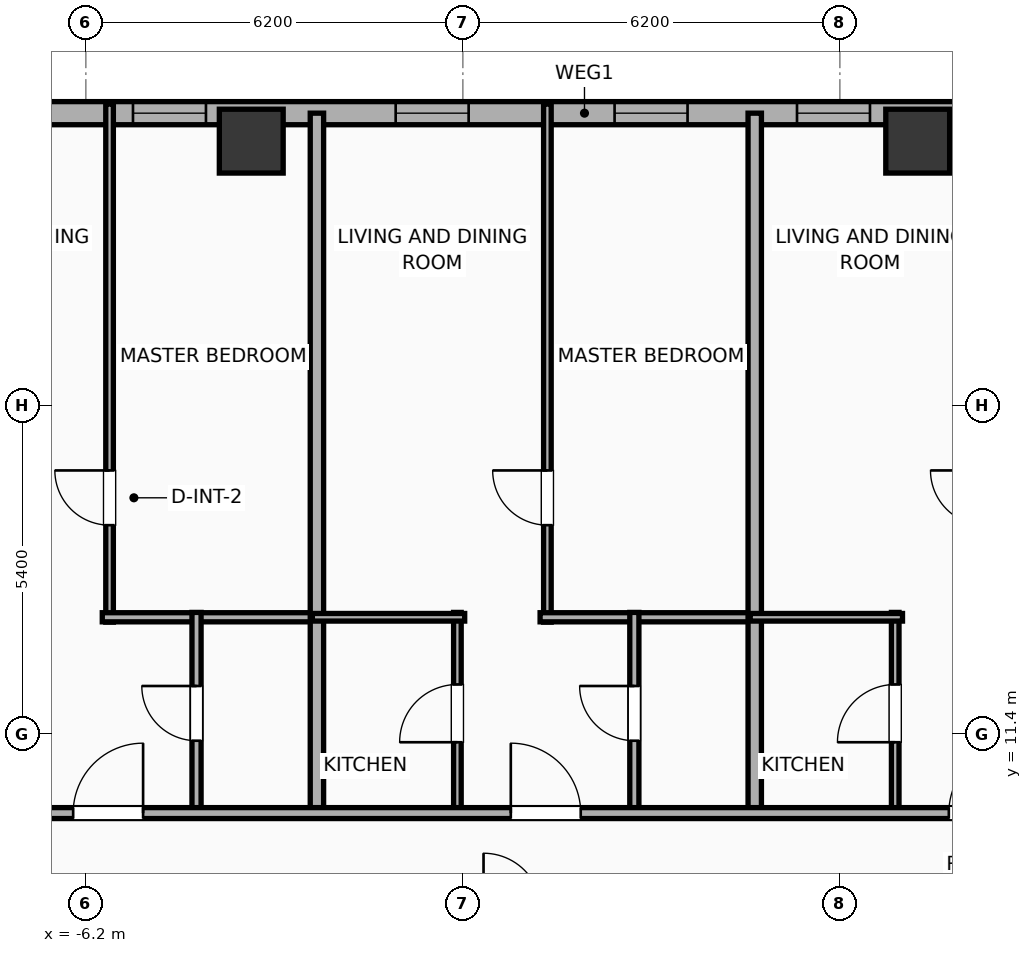
"""IFC4 building model, lengths in metres.
Left out: names, types, materials, properties, quantities, classifications, styles, units other than length and angle.
Written with IfcOpenShell. Run it as: python <this file> out.ifc"""

import sys

from ifc_helpers import new_model, si_unit, direction, frame, frame_2d, origin, origin_2d, place, context, subcontext, project, spatial, rectangle, hollow_rectangle, extrude, element, fill, save


model = new_model("IFC4")
c1 = context("Model", 3, precision=1e-05, world=origin(), true_north=direction((0.0, 1.0)))
c2 = subcontext(c1, "Body", "Model", "MODEL_VIEW")
j1 = project(units=[si_unit("LENGTHUNIT", "METRE"), si_unit("PLANEANGLEUNIT", "RADIAN")], contexts=[c1])
p1 = place(None, origin())
s1 = spatial("IfcSite", under=j1, at=p1, CompositionType="ELEMENT")
p2 = place(p1, origin())
s2 = spatial("IfcBuilding", under=s1, at=p2, CompositionType="ELEMENT")
p3 = place(p2, frame((0.0, 0.0, 136.5)))
s3 = spatial("IfcBuildingStorey", under=s2, at=p3, CompositionType="ELEMENT", Elevation=136.5)
for number, where, z_axis, x_axis in (
    (1, (7.48, 21.15, 0.0), (0.0, 0.0, 1.0), (1.0, 0.0, 0.0)),
    (2, (-3.48, 21.15, 0.0), (0.0, 0.0, 1.0), (1.0, 0.0, 0.0)),
):
    element("IfcColumn", number, at=place(p3, frame(where, z_axis=z_axis, x_axis=x_axis)), inside=s3, PredefinedType="COLUMN", context=c2, shape_type="SweptSolid", body=[
        extrude(hollow_rectangle(XDim=1.05, YDim=1.05, WallThickness=0.036, at=origin_2d()), origin(), (0.0, 0.0, 1.0), 3.865),
    ])
p4 = place(p3, frame((-25.381, 21.61, 0.0), z_axis=(0.0, 0.0, 1.0), x_axis=(1.0, 0.0, 0.0)))
e3 = element("IfcWall", 3, at=p4, inside=s3, PredefinedType="ELEMENTEDWALL", context=c2, shape_type="SweptSolid", body=[
    extrude(rectangle(XDim=54.763, YDim=0.38, at=frame_2d((27.381, 0.0))), origin(), (0.0, 0.0, 1.0), 2.39),
])
p5 = place(p4, frame((5.645, 0.0, 0.75)))
e4 = element("IfcOpeningElement", 4, at=p5, cuts=e3, PredefinedType="OPENING", context=c2, shape_type="SweptSolid", body=[
    extrude(rectangle(XDim=2.4, YDim=1.45, at=frame_2d((1.2, 0.725))), frame((0.0, 0.2, 0.0), z_axis=(0.0, -1.0, 0.0), x_axis=(1.0, 0.0, 0.0)), (0.0, 0.0, 1.0), 0.4),
])
p6 = place(p4, frame((34.677, 0.0, 0.75)))
e5 = element("IfcOpeningElement", 5, at=p6, cuts=e3, PredefinedType="OPENING", context=c2, shape_type="SweptSolid", body=[
    extrude(rectangle(XDim=2.4, YDim=1.45, at=frame_2d((1.2, 0.725))), frame((0.0, 0.2, 0.0), z_axis=(0.0, -1.0, 0.0), x_axis=(1.0, 0.0, 0.0)), (0.0, 0.0, 1.0), 0.4),
])
p7 = place(p4, frame((45.067, 0.0, 0.75)))
e6 = element("IfcOpeningElement", 6, at=p7, cuts=e3, PredefinedType="OPENING", context=c2, shape_type="SweptSolid", body=[
    extrude(rectangle(XDim=2.4, YDim=1.45, at=frame_2d((1.2, 0.725))), frame((0.0, 0.2, 0.0), z_axis=(0.0, -1.0, 0.0), x_axis=(1.0, 0.0, 0.0)), (0.0, 0.0, 1.0), 0.4),
])
p8 = place(p4, frame((2.938, 0.0, 0.55)))
e7 = element("IfcOpeningElement", 7, at=p8, cuts=e3, PredefinedType="OPENING", context=c2, shape_type="SweptSolid", body=[
    extrude(rectangle(XDim=1.2, YDim=1.15, at=frame_2d((0.6, 0.575))), frame((0.0, 0.2, 0.0), z_axis=(0.0, -1.0, 0.0), x_axis=(1.0, 0.0, 0.0)), (0.0, 0.0, 1.0), 0.4),
])
p9 = place(p4, frame((8.916, 0.0, 0.55)))
e8 = element("IfcOpeningElement", 8, at=p9, cuts=e3, PredefinedType="OPENING", context=c2, shape_type="SweptSolid", body=[
    extrude(rectangle(XDim=1.2, YDim=1.15, at=frame_2d((0.6, 0.575))), frame((0.0, 0.2, 0.0), z_axis=(0.0, -1.0, 0.0), x_axis=(1.0, 0.0, 0.0)), (0.0, 0.0, 1.0), 0.4),
])
p10 = place(p4, frame((13.476, 0.0, 0.55)))
e9 = element("IfcOpeningElement", 9, at=p10, cuts=e3, PredefinedType="OPENING", context=c2, shape_type="SweptSolid", body=[
    extrude(rectangle(XDim=1.2, YDim=1.15, at=frame_2d((0.6, 0.575))), frame((0.0, 0.2, 0.0), z_axis=(0.0, -1.0, 0.0), x_axis=(1.0, 0.0, 0.0)), (0.0, 0.0, 1.0), 0.4),
])
p11 = place(p4, frame((17.076, 0.0, 0.55)))
e10 = element("IfcOpeningElement", 10, at=p11, cuts=e3, PredefinedType="OPENING", context=c2, shape_type="SweptSolid", body=[
    extrude(rectangle(XDim=1.2, YDim=1.15, at=frame_2d((0.6, 0.575))), frame((0.0, 0.2, 0.0), z_axis=(0.0, -1.0, 0.0), x_axis=(1.0, 0.0, 0.0)), (0.0, 0.0, 1.0), 0.4),
])
p12 = place(p4, frame((19.956, 0.0, 0.55)))
e11 = element("IfcOpeningElement", 11, at=p12, cuts=e3, PredefinedType="OPENING", context=c2, shape_type="SweptSolid", body=[
    extrude(rectangle(XDim=1.2, YDim=1.15, at=frame_2d((0.6, 0.575))), frame((0.0, 0.2, 0.0), z_axis=(0.0, -1.0, 0.0), x_axis=(1.0, 0.0, 0.0)), (0.0, 0.0, 1.0), 0.4),
])
p13 = place(p4, frame((24.276, 0.0, 0.55)))
e12 = element("IfcOpeningElement", 12, at=p13, cuts=e3, PredefinedType="OPENING", context=c2, shape_type="SweptSolid", body=[
    extrude(rectangle(XDim=1.2, YDim=1.15, at=frame_2d((0.6, 0.575))), frame((0.0, 0.2, 0.0), z_axis=(0.0, -1.0, 0.0), x_axis=(1.0, 0.0, 0.0)), (0.0, 0.0, 1.0), 0.4),
])
p14 = place(p4, frame((27.876, 0.0, 0.55)))
e13 = element("IfcOpeningElement", 13, at=p14, cuts=e3, PredefinedType="OPENING", context=c2, shape_type="SweptSolid", body=[
    extrude(rectangle(XDim=1.2, YDim=1.15, at=frame_2d((0.6, 0.575))), frame((0.0, 0.2, 0.0), z_axis=(0.0, -1.0, 0.0), x_axis=(1.0, 0.0, 0.0)), (0.0, 0.0, 1.0), 0.4),
])
p15 = place(p4, frame((30.876, 0.0, 0.55)))
e14 = element("IfcOpeningElement", 14, at=p15, cuts=e3, PredefinedType="OPENING", context=c2, shape_type="SweptSolid", body=[
    extrude(rectangle(XDim=1.2, YDim=1.15, at=frame_2d((0.6, 0.575))), frame((0.0, 0.2, 0.0), z_axis=(0.0, -1.0, 0.0), x_axis=(1.0, 0.0, 0.0)), (0.0, 0.0, 1.0), 0.4),
])
p16 = place(p4, frame((38.676, 0.0, 0.55)))
e15 = element("IfcOpeningElement", 15, at=p16, cuts=e3, PredefinedType="OPENING", context=c2, shape_type="SweptSolid", body=[
    extrude(rectangle(XDim=1.2, YDim=1.15, at=frame_2d((0.6, 0.575))), frame((0.0, 0.2, 0.0), z_axis=(0.0, -1.0, 0.0), x_axis=(1.0, 0.0, 0.0)), (0.0, 0.0, 1.0), 0.4),
])
p17 = place(p4, frame((41.796, 0.0, 0.55)))
e16 = element("IfcOpeningElement", 16, at=p17, cuts=e3, PredefinedType="OPENING", context=c2, shape_type="SweptSolid", body=[
    extrude(rectangle(XDim=1.2, YDim=1.15, at=frame_2d((0.6, 0.575))), frame((0.0, 0.2, 0.0), z_axis=(0.0, -1.0, 0.0), x_axis=(1.0, 0.0, 0.0)), (0.0, 0.0, 1.0), 0.4),
])
p18 = place(p4, frame((49.476, 0.0, 0.55)))
e17 = element("IfcOpeningElement", 17, at=p18, cuts=e3, PredefinedType="OPENING", context=c2, shape_type="SweptSolid", body=[
    extrude(rectangle(XDim=1.2, YDim=1.15, at=frame_2d((0.6, 0.575))), frame((0.0, 0.2, 0.0), z_axis=(0.0, -1.0, 0.0), x_axis=(1.0, 0.0, 0.0)), (0.0, 0.0, 1.0), 0.4),
])
p19 = place(p4, frame((52.227, 0.0, 0.55)))
e18 = element("IfcOpeningElement", 18, at=p19, cuts=e3, PredefinedType="OPENING", context=c2, shape_type="SweptSolid", body=[
    extrude(rectangle(XDim=1.2, YDim=1.15, at=frame_2d((0.6, 0.575))), frame((0.0, 0.2, 0.0), z_axis=(0.0, -1.0, 0.0), x_axis=(1.0, 0.0, 0.0)), (0.0, 0.0, 1.0), 0.4),
])
p20 = place(p3, frame((-5.81, 13.24, 0.0), z_axis=(0.0, 0.0, 1.0), x_axis=(0.0, 1.0, 0.0)))
e19 = element("IfcWall", 19, at=p20, inside=s3, PredefinedType="PARTITIONING", context=c2, shape_type="SweptSolid", body=[
    extrude(rectangle(XDim=8.52, YDim=0.125, at=frame_2d((4.26, 0.0))), origin(), (0.0, 0.0, 1.0), 3.5),
])
p21 = place(p20, frame((1.595, 0.0, 0.0)))
e20 = element("IfcOpeningElement", 20, at=p21, cuts=e19, PredefinedType="OPENING", context=c2, shape_type="SweptSolid", body=[
    extrude(rectangle(XDim=0.9, YDim=2.05, at=frame_2d((0.45, 1.025))), frame((0.0, 0.073, 0.0), z_axis=(0.0, -1.0, 0.0), x_axis=(1.0, 0.0, 0.0)), (0.0, 0.0, 1.0), 0.145),
])
p22 = place(p3, frame((-5.93, 13.32, 0.0), z_axis=(0.0, 0.0, 1.0), x_axis=(1.0, 0.0, 0.0)))
e21 = element("IfcWall", 21, at=p22, inside=s3, PredefinedType="PLUMBINGWALL", context=c2, shape_type="SweptSolid", body=[
    extrude(rectangle(XDim=3.605, YDim=0.15, at=frame_2d((1.802, 0.0))), origin(), (0.0, 0.0, 1.0), 3.5),
])
p23 = place(p3, frame((-4.38, 10.08, 0.0), z_axis=(0.0, 0.0, 1.0), x_axis=(0.0, 1.0, 0.0)))
e22 = element("IfcWall", 22, at=p23, inside=s3, PredefinedType="PLUMBINGWALL", context=c2, shape_type="SweptSolid", body=[
    extrude(rectangle(XDim=3.32, YDim=0.15, at=frame_2d((1.66, 0.0))), origin(), (0.0, 0.0, 1.0), 3.5),
])
p24 = place(p23, frame((1.21, 0.0, 0.0)))
e23 = element("IfcOpeningElement", 23, at=p24, cuts=e22, PredefinedType="OPENING", context=c2, shape_type="SweptSolid", body=[
    extrude(rectangle(XDim=0.9, YDim=2.05, at=frame_2d((0.45, 1.025))), frame((0.0, 0.085, 0.0), z_axis=(0.0, -1.0, 0.0), x_axis=(1.0, 0.0, 0.0)), (0.0, 0.0, 1.0), 0.17),
])
p25 = place(p3, frame((-2.4, 10.02, 0.0), z_axis=(0.0, 0.0, 1.0), x_axis=(0.0, 1.0, 0.0)))
e24 = element("IfcWall", 24, at=p25, inside=s3, PredefinedType="PARTITIONING", context=c2, shape_type="SweptSolid", body=[
    extrude(rectangle(XDim=11.59, YDim=0.22, at=frame_2d((5.795, 0.0))), origin(), (0.0, 0.0, 1.0), 2.39),
])
p26 = place(p3, frame((1.39, 13.24, 0.0), z_axis=(0.0, 0.0, 1.0), x_axis=(0.0, 1.0, 0.0)))
e25 = element("IfcWall", 25, at=p26, inside=s3, PredefinedType="PARTITIONING", context=c2, shape_type="SweptSolid", body=[
    extrude(rectangle(XDim=8.52, YDim=0.125, at=frame_2d((4.26, 0.0))), origin(), (0.0, 0.0, 1.0), 3.5),
])
p27 = place(p26, frame((1.595, 0.0, 0.0)))
e26 = element("IfcOpeningElement", 26, at=p27, cuts=e25, PredefinedType="OPENING", context=c2, shape_type="SweptSolid", body=[
    extrude(rectangle(XDim=0.9, YDim=2.05, at=frame_2d((0.45, 1.025))), frame((0.0, 0.073, 0.0), z_axis=(0.0, -1.0, 0.0), x_axis=(1.0, 0.0, 0.0)), (0.0, 0.0, 1.0), 0.145),
])
p28 = place(p3, frame((1.27, 13.32, 0.0), z_axis=(0.0, 0.0, 1.0), x_axis=(1.0, 0.0, 0.0)))
e27 = element("IfcWall", 27, at=p28, inside=s3, PredefinedType="PLUMBINGWALL", context=c2, shape_type="SweptSolid", body=[
    extrude(rectangle(XDim=3.605, YDim=0.15, at=frame_2d((1.802, 0.0))), origin(), (0.0, 0.0, 1.0), 3.5),
])
p29 = place(p3, frame((-0.09, 10.08, 0.0), z_axis=(0.0, 0.0, 1.0), x_axis=(0.0, 1.0, 0.0)))
e28 = element("IfcWall", 28, at=p29, inside=s3, PredefinedType="PARTITIONING", context=c2, shape_type="SweptSolid", body=[
    extrude(rectangle(XDim=3.32, YDim=0.125, at=frame_2d((1.66, 0.0))), origin(), (0.0, 0.0, 1.0), 3.5),
])
p30 = place(p29, frame((1.185, 0.0, 0.0)))
e29 = element("IfcOpeningElement", 29, at=p30, cuts=e28, PredefinedType="OPENING", context=c2, shape_type="SweptSolid", body=[
    extrude(rectangle(XDim=0.95, YDim=2.05, at=frame_2d((0.475, 1.025))), frame((0.0, 0.073, 0.0), z_axis=(0.0, -1.0, 0.0), x_axis=(1.0, 0.0, 0.0)), (0.0, 0.0, 1.0), 0.145),
])
p31 = place(p3, frame((-2.475, 13.32, 0.0), z_axis=(0.0, 0.0, 1.0), x_axis=(1.0, 0.0, 0.0)))
e30 = element("IfcWall", 30, at=p31, inside=s3, PredefinedType="PARTITIONING", context=c2, shape_type="SweptSolid", body=[
    extrude(rectangle(XDim=2.505, YDim=0.125, at=frame_2d((1.252, 0.0))), origin(), (0.0, 0.0, 1.0), 3.5),
])
p32 = place(p3, frame((2.82, 10.08, 0.0), z_axis=(0.0, 0.0, 1.0), x_axis=(0.0, 1.0, 0.0)))
e31 = element("IfcWall", 31, at=p32, inside=s3, PredefinedType="PLUMBINGWALL", context=c2, shape_type="SweptSolid", body=[
    extrude(rectangle(XDim=3.32, YDim=0.15, at=frame_2d((1.66, 0.0))), origin(), (0.0, 0.0, 1.0), 3.5),
])
p33 = place(p32, frame((1.21, 0.0, 0.0)))
e32 = element("IfcOpeningElement", 32, at=p33, cuts=e31, PredefinedType="OPENING", context=c2, shape_type="SweptSolid", body=[
    extrude(rectangle(XDim=0.9, YDim=2.05, at=frame_2d((0.45, 1.025))), frame((0.0, 0.085, 0.0), z_axis=(0.0, -1.0, 0.0), x_axis=(1.0, 0.0, 0.0)), (0.0, 0.0, 1.0), 0.17),
])
p34 = place(p3, frame((4.8, 10.02, 0.0), z_axis=(0.0, 0.0, 1.0), x_axis=(0.0, 1.0, 0.0)))
e33 = element("IfcWall", 33, at=p34, inside=s3, PredefinedType="PARTITIONING", context=c2, shape_type="SweptSolid", body=[
    extrude(rectangle(XDim=11.59, YDim=0.22, at=frame_2d((5.795, 0.0))), origin(), (0.0, 0.0, 1.0), 3.5),
])
p35 = place(p3, frame((7.11, 10.08, 0.0), z_axis=(0.0, 0.0, 1.0), x_axis=(0.0, 1.0, 0.0)))
e34 = element("IfcWall", 34, at=p35, inside=s3, PredefinedType="PARTITIONING", context=c2, shape_type="SweptSolid", body=[
    extrude(rectangle(XDim=3.32, YDim=0.125, at=frame_2d((1.66, 0.0))), origin(), (0.0, 0.0, 1.0), 3.5),
])
p36 = place(p35, frame((1.185, 0.0, 0.0)))
e35 = element("IfcOpeningElement", 35, at=p36, cuts=e34, PredefinedType="OPENING", context=c2, shape_type="SweptSolid", body=[
    extrude(rectangle(XDim=0.95, YDim=2.05, at=frame_2d((0.475, 1.025))), frame((0.0, 0.073, 0.0), z_axis=(0.0, -1.0, 0.0), x_axis=(1.0, 0.0, 0.0)), (0.0, 0.0, 1.0), 0.145),
])
p37 = place(p3, frame((4.725, 13.32, 0.0), z_axis=(0.0, 0.0, 1.0), x_axis=(1.0, 0.0, 0.0)))
e36 = element("IfcWall", 36, at=p37, inside=s3, PredefinedType="PARTITIONING", context=c2, shape_type="SweptSolid", body=[
    extrude(rectangle(XDim=2.505, YDim=0.125, at=frame_2d((1.252, 0.0))), origin(), (0.0, 0.0, 1.0), 3.5),
])
p38 = place(p3, frame((-29.21, 10.1, 0.0), z_axis=(0.0, 0.0, 1.0), x_axis=(1.0, 0.0, 0.0)))
e37 = element("IfcWall", 37, at=p38, inside=s3, PredefinedType="PARTITIONING", context=c2, shape_type="SweptSolid", body=[
    extrude(rectangle(XDim=62.42, YDim=0.18, at=frame_2d((31.21, 0.0))), origin(), (0.0, 0.0, 1.0), 2.39),
])
p39 = place(p38, frame((2.74, 0.0, 0.0)))
e38 = element("IfcOpeningElement", 38, at=p39, cuts=e37, PredefinedType="OPENING", context=c2, shape_type="SweptSolid", body=[
    extrude(rectangle(XDim=0.9, YDim=2.05, at=frame_2d((0.45, 1.025))), frame((0.0, 0.1, 0.0), z_axis=(0.0, -1.0, 0.0), x_axis=(1.0, 0.0, 0.0)), (0.0, 0.0, 1.0), 0.2),
])
p40 = place(p38, frame((9.868, 0.0, 0.0)))
e39 = element("IfcOpeningElement", 39, at=p40, cuts=e37, PredefinedType="OPENING", context=c2, shape_type="SweptSolid", body=[
    extrude(rectangle(XDim=1.15, YDim=2.05, at=frame_2d((0.575, 1.025))), frame((0.0, 0.1, 0.0), z_axis=(0.0, -1.0, 0.0), x_axis=(1.0, 0.0, 0.0)), (0.0, 0.0, 1.0), 0.2),
])
p41 = place(p38, frame((15.598, 0.0, 0.0)))
e40 = element("IfcOpeningElement", 40, at=p41, cuts=e37, PredefinedType="OPENING", context=c2, shape_type="SweptSolid", body=[
    extrude(rectangle(XDim=1.15, YDim=2.05, at=frame_2d((0.575, 1.025))), frame((0.0, 0.1, 0.0), z_axis=(0.0, -1.0, 0.0), x_axis=(1.0, 0.0, 0.0)), (0.0, 0.0, 1.0), 0.2),
])
p42 = place(p38, frame((22.801, 0.0, 0.0)))
e41 = element("IfcOpeningElement", 41, at=p42, cuts=e37, PredefinedType="OPENING", context=c2, shape_type="SweptSolid", body=[
    extrude(rectangle(XDim=1.15, YDim=2.05, at=frame_2d((0.575, 1.025))), frame((0.0, 0.1, 0.0), z_axis=(0.0, -1.0, 0.0), x_axis=(1.0, 0.0, 0.0)), (0.0, 0.0, 1.0), 0.2),
])
p43 = place(p38, frame((29.998, 0.0, 0.0)))
e42 = element("IfcOpeningElement", 42, at=p43, cuts=e37, PredefinedType="OPENING", context=c2, shape_type="SweptSolid", body=[
    extrude(rectangle(XDim=1.15, YDim=2.05, at=frame_2d((0.575, 1.025))), frame((0.0, 0.1, 0.0), z_axis=(0.0, -1.0, 0.0), x_axis=(1.0, 0.0, 0.0)), (0.0, 0.0, 1.0), 0.2),
])
p44 = place(p38, frame((37.202, 0.0, 0.0)))
e43 = element("IfcOpeningElement", 43, at=p44, cuts=e37, PredefinedType="OPENING", context=c2, shape_type="SweptSolid", body=[
    extrude(rectangle(XDim=1.15, YDim=2.05, at=frame_2d((0.575, 1.025))), frame((0.0, 0.1, 0.0), z_axis=(0.0, -1.0, 0.0), x_axis=(1.0, 0.0, 0.0)), (0.0, 0.0, 1.0), 0.2),
])
p45 = place(p38, frame((44.399, 0.0, 0.0)))
e44 = element("IfcOpeningElement", 44, at=p45, cuts=e37, PredefinedType="OPENING", context=c2, shape_type="SweptSolid", body=[
    extrude(rectangle(XDim=1.15, YDim=2.05, at=frame_2d((0.575, 1.025))), frame((0.0, 0.1, 0.0), z_axis=(0.0, -1.0, 0.0), x_axis=(1.0, 0.0, 0.0)), (0.0, 0.0, 1.0), 0.2),
])
p46 = place(p38, frame((51.602, 0.0, 0.0)))
e45 = element("IfcOpeningElement", 45, at=p46, cuts=e37, PredefinedType="OPENING", context=c2, shape_type="SweptSolid", body=[
    extrude(rectangle(XDim=1.15, YDim=2.05, at=frame_2d((0.575, 1.025))), frame((0.0, 0.1, 0.0), z_axis=(0.0, -1.0, 0.0), x_axis=(1.0, 0.0, 0.0)), (0.0, 0.0, 1.0), 0.2),
])
p47 = place(p38, frame((58.762, 0.0, 0.0)))
e46 = element("IfcOpeningElement", 46, at=p47, cuts=e37, PredefinedType="OPENING", context=c2, shape_type="SweptSolid", body=[
    extrude(rectangle(XDim=0.9, YDim=2.05, at=frame_2d((0.45, 1.025))), frame((0.0, 0.1, 0.0), z_axis=(0.0, -1.0, 0.0), x_axis=(1.0, 0.0, 0.0)), (0.0, 0.0, 1.0), 0.2),
])
p48 = place(p12, origin())
e47 = element("IfcWindow", 47, at=p48, inside=s3, PartitioningType="SINGLE_PANEL", PredefinedType="WINDOW", context=c2, shape_type="SweptSolid", body=[
    extrude(rectangle(XDim=1.2, YDim=1.15, at=frame_2d((0.6, 0.575))), frame((0.0, 0.03, 0.0), z_axis=(0.0, -1.0, 0.0), x_axis=(1.0, 0.0, 0.0)), (0.0, 0.0, 1.0), 0.06),
])
fill(e11, e47)
p49 = place(p13, origin())
e48 = element("IfcWindow", 48, at=p49, inside=s3, PartitioningType="SINGLE_PANEL", PredefinedType="WINDOW", context=c2, shape_type="SweptSolid", body=[
    extrude(rectangle(XDim=1.2, YDim=1.15, at=frame_2d((0.6, 0.575))), frame((0.0, 0.03, 0.0), z_axis=(0.0, -1.0, 0.0), x_axis=(1.0, 0.0, 0.0)), (0.0, 0.0, 1.0), 0.06),
])
fill(e12, e48)
p50 = place(p14, origin())
e49 = element("IfcWindow", 49, at=p50, inside=s3, PartitioningType="SINGLE_PANEL", PredefinedType="WINDOW", context=c2, shape_type="SweptSolid", body=[
    extrude(rectangle(XDim=1.2, YDim=1.15, at=frame_2d((0.6, 0.575))), frame((0.0, 0.03, 0.0), z_axis=(0.0, -1.0, 0.0), x_axis=(1.0, 0.0, 0.0)), (0.0, 0.0, 1.0), 0.06),
])
fill(e13, e49)
p51 = place(p15, origin())
e50 = element("IfcWindow", 50, at=p51, inside=s3, PartitioningType="SINGLE_PANEL", PredefinedType="WINDOW", context=c2, shape_type="SweptSolid", body=[
    extrude(rectangle(XDim=1.2, YDim=1.15, at=frame_2d((0.6, 0.575))), frame((0.0, 0.03, 0.0), z_axis=(0.0, -1.0, 0.0), x_axis=(1.0, 0.0, 0.0)), (0.0, 0.0, 1.0), 0.06),
])
fill(e14, e50)
p52 = place(p21, origin())
e51 = element("IfcDoor", 51, at=p52, inside=s3, OperationType="SINGLE_SWING_RIGHT", PredefinedType="DOOR", context=c2, shape_type="SweptSolid", body=[
    extrude(rectangle(XDim=0.9, YDim=2.05, at=frame_2d((0.45, 1.025))), frame((0.0, 0.025, 0.0), z_axis=(0.0, -1.0, 0.0), x_axis=(1.0, 0.0, 0.0)), (0.0, 0.0, 1.0), 0.05),
])
fill(e20, e51)
p53 = place(p24, origin())
e52 = element("IfcDoor", 52, at=p53, inside=s3, OperationType="SINGLE_SWING_RIGHT", PredefinedType="DOOR", context=c2, shape_type="SweptSolid", body=[
    extrude(rectangle(XDim=0.9, YDim=2.05, at=frame_2d((0.45, 1.025))), frame((0.0, 0.025, 0.0), z_axis=(0.0, -1.0, 0.0), x_axis=(1.0, 0.0, 0.0)), (0.0, 0.0, 1.0), 0.05),
])
fill(e23, e52)
p54 = place(p27, origin())
e53 = element("IfcDoor", 53, at=p54, inside=s3, OperationType="SINGLE_SWING_RIGHT", PredefinedType="DOOR", context=c2, shape_type="SweptSolid", body=[
    extrude(rectangle(XDim=0.9, YDim=2.05, at=frame_2d((0.45, 1.025))), frame((0.0, 0.025, 0.0), z_axis=(0.0, -1.0, 0.0), x_axis=(1.0, 0.0, 0.0)), (0.0, 0.0, 1.0), 0.05),
])
fill(e26, e53)
p55 = place(p30, origin())
e54 = element("IfcDoor", 54, at=p55, inside=s3, OperationType="SINGLE_SWING_LEFT", PredefinedType="DOOR", context=c2, shape_type="SweptSolid", body=[
    extrude(rectangle(XDim=0.95, YDim=2.05, at=frame_2d((0.475, 1.025))), frame((0.0, 0.025, 0.0), z_axis=(0.0, -1.0, 0.0), x_axis=(1.0, 0.0, 0.0)), (0.0, 0.0, 1.0), 0.05),
])
fill(e29, e54)
p56 = place(p33, origin())
e55 = element("IfcDoor", 55, at=p56, inside=s3, OperationType="SINGLE_SWING_RIGHT", PredefinedType="DOOR", context=c2, shape_type="SweptSolid", body=[
    extrude(rectangle(XDim=0.9, YDim=2.05, at=frame_2d((0.45, 1.025))), frame((0.0, 0.025, 0.0), z_axis=(0.0, -1.0, 0.0), x_axis=(1.0, 0.0, 0.0)), (0.0, 0.0, 1.0), 0.05),
])
fill(e32, e55)
p57 = place(p36, origin())
e56 = element("IfcDoor", 56, at=p57, inside=s3, OperationType="SINGLE_SWING_LEFT", PredefinedType="DOOR", context=c2, shape_type="SweptSolid", body=[
    extrude(rectangle(XDim=0.95, YDim=2.05, at=frame_2d((0.475, 1.025))), frame((0.0, 0.025, 0.0), z_axis=(0.0, -1.0, 0.0), x_axis=(1.0, 0.0, 0.0)), (0.0, 0.0, 1.0), 0.05),
])
fill(e35, e56)
p58 = place(p42, origin())
e57 = element("IfcDoor", 57, at=p58, inside=s3, OperationType="SINGLE_SWING_RIGHT", PredefinedType="DOOR", context=c2, shape_type="SweptSolid", body=[
    extrude(rectangle(XDim=1.15, YDim=2.05, at=frame_2d((0.575, 1.025))), frame((0.0, 0.025, 0.0), z_axis=(0.0, -1.0, 0.0), x_axis=(1.0, 0.0, 0.0)), (0.0, 0.0, 1.0), 0.05),
])
fill(e41, e57)
p59 = place(p43, origin())
e58 = element("IfcDoor", 58, at=p59, inside=s3, OperationType="SINGLE_SWING_LEFT", PredefinedType="DOOR", context=c2, shape_type="SweptSolid", body=[
    extrude(rectangle(XDim=1.15, YDim=2.05, at=frame_2d((0.575, 1.025))), frame((0.0, 0.025, 0.0), z_axis=(0.0, -1.0, 0.0), x_axis=(1.0, 0.0, 0.0)), (0.0, 0.0, 1.0), 0.05),
])
fill(e42, e58)
p60 = place(p44, origin())
e59 = element("IfcDoor", 59, at=p60, inside=s3, OperationType="SINGLE_SWING_RIGHT", PredefinedType="DOOR", context=c2, shape_type="SweptSolid", body=[
    extrude(rectangle(XDim=1.15, YDim=2.05, at=frame_2d((0.575, 1.025))), frame((0.0, 0.025, 0.0), z_axis=(0.0, -1.0, 0.0), x_axis=(1.0, 0.0, 0.0)), (0.0, 0.0, 1.0), 0.05),
])
fill(e43, e59)
save(model, sys.argv[1])
